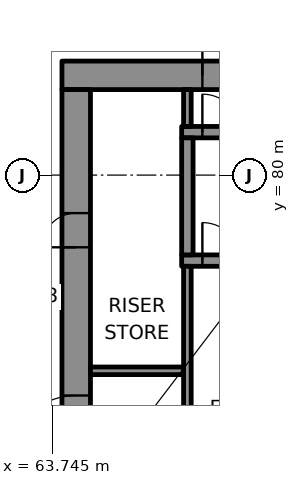
"""IFC4 building model, lengths in metres.
Left out: names, types, materials, properties, quantities, classifications, styles, units other than length and angle.
Written with IfcOpenShell. Run it as: python <this file> out.ifc"""

import sys

from ifc_helpers import new_model, si_unit, direction, frame, frame_2d, origin, place, context, subcontext, project, spatial, rectangle, extrude, element, fill, save


model = new_model("IFC4")
c1 = context("Model", 3, precision=1e-05, world=origin(), true_north=direction((0.0, 1.0)))
c2 = subcontext(c1, "Body", "Model", "MODEL_VIEW")
j1 = project(units=[si_unit("LENGTHUNIT", "METRE"), si_unit("PLANEANGLEUNIT", "RADIAN")], contexts=[c1])
p1 = place(None, origin())
s1 = spatial("IfcSite", under=j1, at=p1, CompositionType="ELEMENT")
p2 = place(p1, origin())
s2 = spatial("IfcBuilding", under=s1, at=p2, CompositionType="ELEMENT")
p3 = place(p2, frame((0.0, 0.0, 233.8)))
s3 = spatial("IfcBuildingStorey", under=s2, at=p3, CompositionType="ELEMENT", Elevation=233.8)
p4 = place(p3, frame((64.0, 82.625, 0.0), z_axis=(0.0, 0.0, 1.0), x_axis=(1.0, 0.0, 0.0)))
e1 = element("IfcWall", 1, at=p4, inside=s3, PredefinedType="SHEAR", context=c2, shape_type="SweptSolid", body=[
    extrude(rectangle(XDim=22.0, YDim=0.75, at=frame_2d((11.0, 0.0))), origin(), (0.0, 0.0, 1.0), 3.7),
])
p5 = place(p4, frame((3.695, 0.0, 0.0)))
e2 = element("IfcOpeningElement", 2, at=p5, cuts=e1, PredefinedType="OPENING", context=c2, shape_type="SweptSolid", body=[
    extrude(rectangle(XDim=1.0, YDim=2.1, at=frame_2d((0.5, 1.05))), frame((0.0, 0.385, 0.0), z_axis=(0.0, -1.0, 0.0), x_axis=(1.0, 0.0, 0.0)), (0.0, 0.0, 1.0), 0.77),
])
p6 = place(p4, frame((17.505, 0.0, 0.0)))
e3 = element("IfcOpeningElement", 3, at=p6, cuts=e1, PredefinedType="OPENING", context=c2, shape_type="SweptSolid", body=[
    extrude(rectangle(XDim=1.0, YDim=2.1, at=frame_2d((0.5, 1.05))), frame((0.0, 0.385, 0.0), z_axis=(0.0, -1.0, 0.0), x_axis=(1.0, 0.0, 0.0)), (0.0, 0.0, 1.0), 0.77),
])
p7 = place(p4, frame((10.65, 0.0, 0.0)))
e4 = element("IfcOpeningElement", 4, at=p7, cuts=e1, PredefinedType="OPENING", context=c2, shape_type="SweptSolid", body=[
    extrude(rectangle(XDim=0.9, YDim=2.1, at=frame_2d((0.45, 1.05))), frame((0.0, 0.385, 0.0), z_axis=(0.0, -1.0, 0.0), x_axis=(1.0, 0.0, 0.0)), (0.0, 0.0, 1.0), 0.77),
])
p8 = place(p3, frame((64.375, 67.75, 0.0), z_axis=(0.0, 0.0, 1.0), x_axis=(0.0, 1.0, 0.0)))
e5 = element("IfcWall", 5, at=p8, inside=s3, PredefinedType="SHEAR", context=c2, shape_type="SweptSolid", body=[
    extrude(rectangle(XDim=14.5, YDim=0.75, at=frame_2d((7.25, 0.0))), origin(), (0.0, 0.0, 1.0), 3.7),
])
p9 = place(p8, frame((4.65, 0.0, 0.0)))
e6 = element("IfcOpeningElement", 6, at=p9, cuts=e5, PredefinedType="OPENING", context=c2, shape_type="SweptSolid", body=[
    extrude(rectangle(XDim=1.8, YDim=2.1, at=frame_2d((0.9, 1.05))), frame((0.0, 0.385, 0.0), z_axis=(0.0, -1.0, 0.0), x_axis=(1.0, 0.0, 0.0)), (0.0, 0.0, 1.0), 0.77),
])
p10 = place(p8, frame((2.55, 0.0, 0.0)))
e7 = element("IfcOpeningElement", 7, at=p10, cuts=e5, PredefinedType="OPENING", context=c2, shape_type="SweptSolid", body=[
    extrude(rectangle(XDim=0.9, YDim=2.1, at=frame_2d((0.45, 1.05))), frame((0.0, 0.385, 0.0), z_axis=(0.0, -1.0, 0.0), x_axis=(1.0, 0.0, 0.0)), (0.0, 0.0, 1.0), 0.77),
])
p11 = place(p8, frame((10.35, 0.0, 0.0)))
e8 = element("IfcOpeningElement", 8, at=p11, cuts=e5, PredefinedType="OPENING", context=c2, shape_type="SweptSolid", body=[
    extrude(rectangle(XDim=0.9, YDim=2.1, at=frame_2d((0.45, 1.05))), frame((0.0, 0.385, 0.0), z_axis=(0.0, -1.0, 0.0), x_axis=(1.0, 0.0, 0.0)), (0.0, 0.0, 1.0), 0.77),
])
p12 = place(p3, frame((67.15, 77.75, 0.0), z_axis=(0.0, 0.0, 1.0), x_axis=(1.0, 0.0, 0.0)))
e9 = element("IfcWall", 9, at=p12, inside=s3, PredefinedType="SHEAR", context=c2, shape_type="SweptSolid", body=[
    extrude(rectangle(XDim=17.45, YDim=0.3, at=frame_2d((8.725, 0.0))), origin(), (0.0, 0.0, 1.0), 3.7),
])
p13 = place(p12, frame((0.545, 0.0, 0.0)))
e10 = element("IfcOpeningElement", 10, at=p13, cuts=e9, PredefinedType="OPENING", context=c2, shape_type="SweptSolid", body=[
    extrude(rectangle(XDim=1.0, YDim=2.1, at=frame_2d((0.5, 1.05))), frame((0.0, 0.16, 0.0), z_axis=(0.0, -1.0, 0.0), x_axis=(1.0, 0.0, 0.0)), (0.0, 0.0, 1.0), 0.32),
])
p14 = place(p3, frame((67.15, 81.13, 0.0), z_axis=(0.0, 0.0, 1.0), x_axis=(1.0, 0.0, 0.0)))
e11 = element("IfcWall", 11, at=p14, inside=s3, PredefinedType="SHEAR", context=c2, shape_type="SweptSolid", body=[
    extrude(rectangle(XDim=6.91, YDim=0.3, at=frame_2d((3.455, 0.0))), origin(), (0.0, 0.0, 1.0), 3.7),
])
p15 = place(p14, frame((0.545, 0.0, 0.0)))
e12 = element("IfcOpeningElement", 12, at=p15, cuts=e11, PredefinedType="OPENING", context=c2, shape_type="SweptSolid", body=[
    extrude(rectangle(XDim=1.0, YDim=2.1, at=frame_2d((0.5, 1.05))), frame((0.0, 0.16, 0.0), z_axis=(0.0, -1.0, 0.0), x_axis=(1.0, 0.0, 0.0)), (0.0, 0.0, 1.0), 0.32),
])
p16 = place(p3, frame((67.3, 77.9, 0.0), z_axis=(0.0, 0.0, 1.0), x_axis=(0.0, 1.0, 0.0)))
e13 = element("IfcWall", 13, at=p16, inside=s3, PredefinedType="SHEAR", context=c2, shape_type="SweptSolid", body=[
    extrude(rectangle(XDim=3.08, YDim=0.3, at=frame_2d((1.54, 0.0))), origin(), (0.0, 0.0, 1.0), 3.7),
])
p17 = place(p3, frame((64.75, 74.85, 0.0), z_axis=(0.0, 0.0, 1.0), x_axis=(1.0, 0.0, 0.0)))
e14 = element("IfcWall", 14, at=p17, inside=s3, PredefinedType="PARTITIONING", context=c2, shape_type="SweptSolid", body=[
    extrude(rectangle(XDim=2.45, YDim=0.2, at=frame_2d((1.225, 0.0))), origin(), (0.0, 0.0, 1.0), 3.7),
])
p18 = place(p3, frame((67.3, 71.85, 0.0), z_axis=(0.0, 0.0, 1.0), x_axis=(0.0, 1.0, 0.0)))
e15 = element("IfcWall", 15, at=p18, inside=s3, PredefinedType="PARTITIONING", context=c2, shape_type="SweptSolid", body=[
    extrude(rectangle(XDim=5.75, YDim=0.2, at=frame_2d((2.875, 0.0))), origin(), (0.0, 0.0, 1.0), 3.7),
])
p19 = place(p18, frame((0.85, 0.0, 0.0)))
e16 = element("IfcOpeningElement", 16, at=p19, cuts=e15, PredefinedType="OPENING", context=c2, shape_type="SweptSolid", body=[
    extrude(rectangle(XDim=1.2, YDim=2.1, at=frame_2d((0.6, 1.05))), frame((0.0, 0.11, 0.0), z_axis=(0.0, -1.0, 0.0), x_axis=(1.0, 0.0, 0.0)), (0.0, 0.0, 1.0), 0.22),
])
p20 = place(p3, frame((67.3, 81.28, 0.0), z_axis=(0.0, 0.0, 1.0), x_axis=(0.0, 1.0, 0.0)))
e17 = element("IfcWall", 17, at=p20, inside=s3, PredefinedType="PARTITIONING", context=c2, shape_type="SweptSolid", body=[
    extrude(rectangle(XDim=0.97, YDim=0.2, at=frame_2d((0.485, 0.0))), origin(), (0.0, 0.0, 1.0), 3.7),
])
p21 = place(p13, origin())
e18 = element("IfcDoor", 18, at=p21, inside=s3, OperationType="SINGLE_SWING_LEFT", PredefinedType="DOOR", context=c2, shape_type="SweptSolid", body=[
    extrude(rectangle(XDim=1.0, YDim=2.1, at=frame_2d((0.5, 1.05))), frame((0.0, 0.025, 0.0), z_axis=(0.0, -1.0, 0.0), x_axis=(1.0, 0.0, 0.0)), (0.0, 0.0, 1.0), 0.05),
])
fill(e10, e18)
p22 = place(p15, origin())
e19 = element("IfcDoor", 19, at=p22, inside=s3, OperationType="SINGLE_SWING_RIGHT", PredefinedType="DOOR", context=c2, shape_type="SweptSolid", body=[
    extrude(rectangle(XDim=1.0, YDim=2.1, at=frame_2d((0.5, 1.05))), frame((0.0, 0.025, 0.0), z_axis=(0.0, -1.0, 0.0), x_axis=(1.0, 0.0, 0.0)), (0.0, 0.0, 1.0), 0.05),
])
fill(e12, e19)
p23 = place(p5, origin())
e20 = element("IfcDoor", 20, at=p23, inside=s3, OperationType="SINGLE_SWING_LEFT", PredefinedType="DOOR", context=c2, shape_type="SweptSolid", body=[
    extrude(rectangle(XDim=1.0, YDim=2.1, at=frame_2d((0.5, 1.05))), frame((0.0, 0.095, 0.0), z_axis=(0.0, -1.0, 0.0), x_axis=(1.0, 0.0, 0.0)), (0.0, 0.0, 1.0), 0.19),
])
fill(e2, e20)
p24 = place(p9, origin())
e21 = element("IfcDoor", 21, at=p24, inside=s3, OperationType="SINGLE_SWING_LEFT", PredefinedType="DOOR", context=c2, shape_type="SweptSolid", body=[
    extrude(rectangle(XDim=1.8, YDim=2.1, at=frame_2d((0.9, 1.05))), frame((0.0, 0.095, 0.0), z_axis=(0.0, -1.0, 0.0), x_axis=(1.0, 0.0, 0.0)), (0.0, 0.0, 1.0), 0.19),
])
fill(e6, e21)
p25 = place(p11, origin())
e22 = element("IfcDoor", 22, at=p25, inside=s3, OperationType="SINGLE_SWING_RIGHT", PredefinedType="DOOR", context=c2, shape_type="SweptSolid", body=[
    extrude(rectangle(XDim=0.9, YDim=2.1, at=frame_2d((0.45, 1.05))), frame((0.0, 0.095, 0.0), z_axis=(0.0, -1.0, 0.0), x_axis=(1.0, 0.0, 0.0)), (0.0, 0.0, 1.0), 0.19),
])
fill(e8, e22)
save(model, sys.argv[1])
